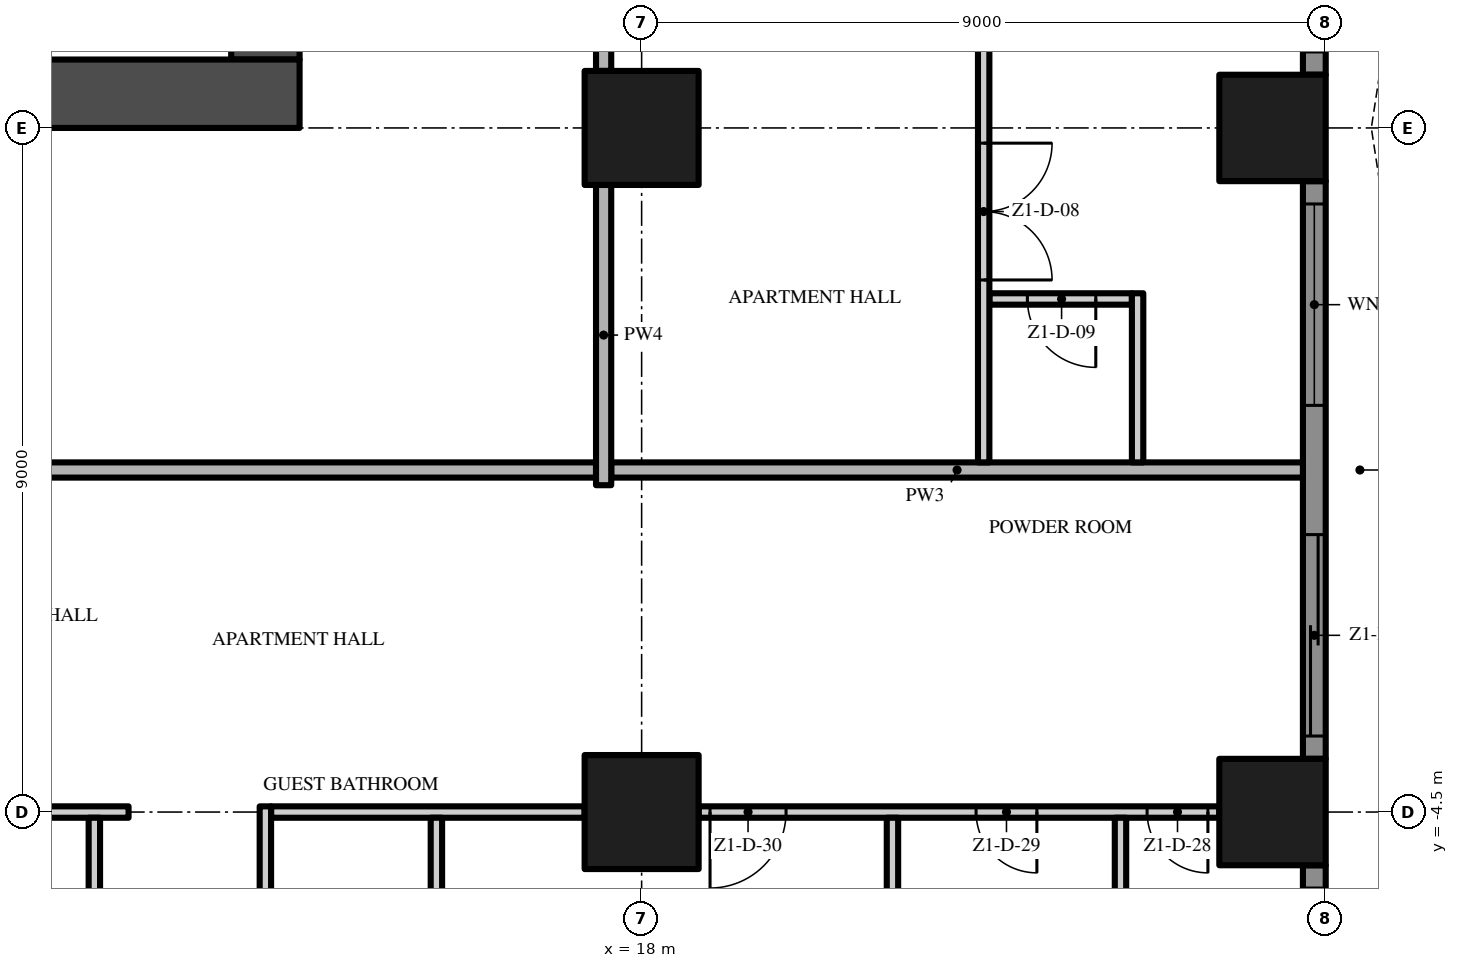
"""IFC4 building model, lengths in metres.
Left out: names, types, materials, properties, quantities, classifications, styles, units other than length and angle.
Written with IfcOpenShell. Run it as: python <this file> out.ifc"""

import sys

from ifc_helpers import new_model, si_unit, direction, frame, frame_2d, origin, origin_2d, place, context, subcontext, project, spatial, polyline, rectangle, outline, extrude, element, fill, save


model = new_model("IFC4")
c1 = context("Model", 3, precision=1e-05, world=origin(), true_north=direction((0.0, 1.0)))
c2 = subcontext(c1, "Body", "Model", "MODEL_VIEW")
j1 = project(units=[si_unit("LENGTHUNIT", "METRE"), si_unit("PLANEANGLEUNIT", "RADIAN")], contexts=[c1])
p1 = place(None, origin())
s1 = spatial("IfcSite", under=j1, at=p1, CompositionType="ELEMENT")
p2 = place(p1, origin())
s2 = spatial("IfcBuilding", under=s1, at=p2, CompositionType="ELEMENT")
p3 = place(p2, frame((0.0, 0.0, 53.0)))
s3 = spatial("IfcBuildingStorey", under=s2, at=p3, CompositionType="ELEMENT", Elevation=53.0)
p4 = place(p3, frame((-13.5, 4.95, -0.3), z_axis=(0.0, 0.0, 1.0), x_axis=(1.0, 0.0, 0.0)))
e1 = element("IfcWall", 1, at=p4, inside=s3, PredefinedType="SHEAR", context=c2, shape_type="SweptSolid", body=[
    extrude(rectangle(XDim=27.0, YDim=0.9, at=frame_2d((13.5, 0.0))), origin(), (0.0, 0.0, 1.0), 3.8),
])
p5 = place(p4, frame((12.0, 0.0, 0.3)))
e2 = element("IfcOpeningElement", 2, at=p5, cuts=e1, PredefinedType="OPENING", context=c2, shape_type="SweptSolid", body=[
    extrude(rectangle(XDim=3.0, YDim=2.4, at=frame_2d((1.5, 1.2))), frame((0.0, 0.46, 0.0), z_axis=(0.0, -1.0, 0.0), x_axis=(1.0, 0.0, 0.0)), (0.0, 0.0, 1.0), 0.92),
])
p6 = place(p4, frame((4.9, 0.0, 0.3)))
e3 = element("IfcOpeningElement", 3, at=p6, cuts=e1, PredefinedType="OPENING", context=c2, shape_type="SweptSolid", body=[
    extrude(rectangle(XDim=1.2, YDim=2.2, at=frame_2d((0.6, 1.1))), frame((0.0, 0.46, 0.0), z_axis=(0.0, -1.0, 0.0), x_axis=(1.0, 0.0, 0.0)), (0.0, 0.0, 1.0), 0.92),
])
p7 = place(p4, frame((20.75, 0.0, 0.3)))
e4 = element("IfcOpeningElement", 4, at=p7, cuts=e1, PredefinedType="OPENING", context=c2, shape_type="SweptSolid", body=[
    extrude(rectangle(XDim=1.5, YDim=2.2, at=frame_2d((0.75, 1.1))), frame((0.0, 0.46, 0.0), z_axis=(0.0, -1.0, 0.0), x_axis=(1.0, 0.0, 0.0)), (0.0, 0.0, 1.0), 0.92),
])
p8 = place(p4, frame((17.4, 0.0, 0.3)))
e5 = element("IfcOpeningElement", 5, at=p8, cuts=e1, PredefinedType="OPENING", context=c2, shape_type="SweptSolid", body=[
    extrude(rectangle(XDim=1.2, YDim=2.2, at=frame_2d((0.6, 1.1))), frame((0.0, 0.46, 0.0), z_axis=(0.0, -1.0, 0.0), x_axis=(1.0, 0.0, 0.0)), (0.0, 0.0, 1.0), 0.92),
])
p9 = place(p3, frame((13.05, 5.4, -0.3), z_axis=(0.0, 0.0, 1.0), x_axis=(0.0, 1.0, 0.0)))
e6 = element("IfcWall", 6, at=p9, inside=s3, PredefinedType="SHEAR", context=c2, shape_type="SweptSolid", body=[
    extrude(rectangle(XDim=16.2, YDim=0.9, at=frame_2d((8.1, 0.0))), origin(), (0.0, 0.0, 1.0), 3.8),
])
p10 = place(p9, frame((6.0, 0.0, 0.3)))
e7 = element("IfcOpeningElement", 7, at=p10, cuts=e6, PredefinedType="OPENING", context=c2, shape_type="SweptSolid", body=[
    extrude(rectangle(XDim=1.2, YDim=2.2, at=frame_2d((0.6, 1.1))), frame((0.0, 0.46, 0.0), z_axis=(0.0, -1.0, 0.0), x_axis=(1.0, 0.0, 0.0)), (0.0, 0.0, 1.0), 0.92),
])
for number, where, z_axis, x_axis in (
    (8, (18.0, -4.5, 0.0), (0.0, 0.0, 1.0), (1.0, 0.0, 0.0)),
    (9, (18.0, 4.5, 0.0), (0.0, 0.0, 1.0), (1.0, 0.0, 0.0)),
):
    element("IfcColumn", number, at=place(p3, frame(where, z_axis=z_axis, x_axis=x_axis)), inside=s3, PredefinedType="COLUMN", context=c2, shape_type="SweptSolid", body=[
        extrude(rectangle(XDim=1.5, YDim=1.5, at=origin_2d()), origin(), (0.0, 0.0, 1.0), 3.5),
    ])
for number, where, z_axis, x_axis in (
    (10, (26.3, -4.5, 0.0), (0.0, 0.0, 1.0), (1.0, 0.0, 0.0)),
    (11, (26.3, 4.5, 0.0), (0.0, 0.0, 1.0), (1.0, 0.0, 0.0)),
):
    element("IfcColumn", number, at=place(p3, frame(where, z_axis=z_axis, x_axis=x_axis)), inside=s3, PredefinedType="COLUMN", context=c2, shape_type="SweptSolid", body=[
        extrude(rectangle(XDim=1.4, YDim=1.4, at=origin_2d()), origin(), (0.0, 0.0, 1.0), 3.5),
    ])
p11 = place(p3, frame((26.85, -5.2, 0.0), z_axis=(0.0, 0.0, 1.0), x_axis=(0.0, -1.0, 0.0)))
e12 = element("IfcWall", 12, at=p11, inside=s3, PredefinedType="SOLIDWALL", context=c2, shape_type="SweptSolid", body=[
    extrude(rectangle(XDim=7.6, YDim=0.3, at=frame_2d((3.8, 0.0))), origin(), (0.0, 0.0, 1.0), 3.5),
])
p12 = place(p11, frame((4.65, 0.0, 0.45)))
e13 = element("IfcOpeningElement", 13, at=p12, cuts=e12, PredefinedType="OPENING", context=c2, shape_type="SweptSolid", body=[
    extrude(rectangle(XDim=2.65, YDim=2.65, at=frame_2d((1.325, 1.325))), frame((0.0, 0.16, 0.0), z_axis=(0.0, -1.0, 0.0), x_axis=(1.0, 0.0, 0.0)), (0.0, 0.0, 1.0), 0.32),
])
p13 = place(p11, frame((0.3, 0.0, 0.45)))
e14 = element("IfcOpeningElement", 14, at=p13, cuts=e12, PredefinedType="OPENING", context=c2, shape_type="SweptSolid", body=[
    extrude(rectangle(XDim=2.65, YDim=2.65, at=frame_2d((1.325, 1.325))), frame((0.0, 0.16, 0.0), z_axis=(0.0, -1.0, 0.0), x_axis=(1.0, 0.0, 0.0)), (0.0, 0.0, 1.0), 0.32),
])
p14 = place(p3, frame((26.85, 3.8, 0.0), z_axis=(0.0, 0.0, 1.0), x_axis=(0.0, -1.0, 0.0)))
e15 = element("IfcWall", 15, at=p14, inside=s3, PredefinedType="SOLIDWALL", context=c2, shape_type="SweptSolid", body=[
    extrude(rectangle(XDim=7.6, YDim=0.3, at=frame_2d((3.8, 0.0))), origin(), (0.0, 0.0, 1.0), 3.5),
])
p15 = place(p14, frame((4.65, 0.0, 0.0)))
e16 = element("IfcOpeningElement", 16, at=p15, cuts=e15, PredefinedType="OPENING", context=c2, shape_type="SweptSolid", body=[
    extrude(rectangle(XDim=2.65, YDim=2.4, at=frame_2d((1.325, 1.2))), frame((0.0, 0.16, 0.0), z_axis=(0.0, -1.0, 0.0), x_axis=(1.0, 0.0, 0.0)), (0.0, 0.0, 1.0), 0.32),
])
p16 = place(p14, frame((0.3, 0.0, 0.45)))
e17 = element("IfcOpeningElement", 17, at=p16, cuts=e15, PredefinedType="OPENING", context=c2, shape_type="SweptSolid", body=[
    extrude(rectangle(XDim=2.65, YDim=2.65, at=frame_2d((1.325, 1.325))), frame((0.0, 0.16, 0.0), z_axis=(0.0, -1.0, 0.0), x_axis=(1.0, 0.0, 0.0)), (0.0, 0.0, 1.0), 0.32),
])
p17 = place(p3, frame((26.85, 12.8, 0.0), z_axis=(0.0, 0.0, 1.0), x_axis=(0.0, -1.0, 0.0)))
e18 = element("IfcWall", 18, at=p17, inside=s3, PredefinedType="SOLIDWALL", context=c2, shape_type="SweptSolid", body=[
    extrude(rectangle(XDim=7.6, YDim=0.3, at=frame_2d((3.8, 0.0))), origin(), (0.0, 0.0, 1.0), 3.5),
])
p18 = place(p17, frame((4.65, 0.0, 0.45)))
e19 = element("IfcOpeningElement", 19, at=p18, cuts=e18, PredefinedType="OPENING", context=c2, shape_type="SweptSolid", body=[
    extrude(rectangle(XDim=2.65, YDim=2.65, at=frame_2d((1.325, 1.325))), frame((0.0, 0.16, 0.0), z_axis=(0.0, -1.0, 0.0), x_axis=(1.0, 0.0, 0.0)), (0.0, 0.0, 1.0), 0.32),
])
p19 = place(p17, frame((0.3, 0.0, 0.0)))
e20 = element("IfcOpeningElement", 20, at=p19, cuts=e18, PredefinedType="OPENING", context=c2, shape_type="SweptSolid", body=[
    extrude(rectangle(XDim=2.65, YDim=2.4, at=frame_2d((1.325, 1.2))), frame((0.0, 0.16, 0.0), z_axis=(0.0, -1.0, 0.0), x_axis=(1.0, 0.0, 0.0)), (0.0, 0.0, 1.0), 0.32),
])
p20 = place(p3, origin())
e21 = element("IfcWall", 21, at=p20, inside=s3, PredefinedType="USERDEFINED", context=c2, shape_type="SweptSolid", body=[
    extrude(outline(polyline([(30.0, -18.0), (29.771, -16.5), (29.171, -15.0), (28.429, -13.5), (27.829, -12.0), (27.6, -10.5), (27.829, -9.0), (28.429, -7.5), (29.171, -6.0), (29.771, -4.5), (30.0, -3.0), (29.771, -1.5), (29.171, 0.0), (28.429, 1.5), (27.829, 3.0), (27.6, 4.5), (27.829, 6.0), (28.429, 7.5), (29.171, 9.0), (29.771, 10.5), (30.0, 12.0), (29.771, 13.5), (29.171, 15.0), (28.429, 16.5), (27.829, 18.0), (27.597, 17.907), (28.201, 16.398), (28.942, 14.898), (29.528, 13.434), (29.747, 12.0), (29.528, 10.566), (28.942, 9.102), (28.201, 7.602), (27.586, 6.066), (27.347, 4.5), (27.586, 2.934), (28.201, 1.398), (28.942, -0.102), (29.528, -1.566), (29.747, -3.0), (29.528, -4.434), (28.942, -5.898), (28.201, -7.398), (27.586, -8.934), (27.347, -10.5), (27.586, -12.066), (28.201, -13.602), (28.942, -15.102), (29.528, -16.566), (29.753, -18.038), (30.0, -18.0)])), origin(), (0.0, 0.0, 1.0), 0.9),
])
p21 = place(p3, frame((9.75, -4.5, 0.0), z_axis=(0.0, 0.0, 1.0), x_axis=(1.0, 0.0, 0.0)))
e22 = element("IfcWall", 22, at=p21, inside=s3, PredefinedType="PARTITIONING", context=c2, shape_type="SweptSolid", body=[
    extrude(rectangle(XDim=1.5, YDim=0.15, at=frame_2d((0.75, 0.0))), origin(), (0.0, 0.0, 1.0), 3.5),
])
p22 = place(p3, frame((13.125, -4.5, 0.0), z_axis=(0.0, 0.0, 1.0), x_axis=(1.0, 0.0, 0.0)))
e23 = element("IfcWall", 23, at=p22, inside=s3, PredefinedType="PARTITIONING", context=c2, shape_type="SweptSolid", body=[
    extrude(rectangle(XDim=4.125, YDim=0.15, at=frame_2d((2.062, 0.0))), origin(), (0.0, 0.0, 1.0), 3.5),
])
p23 = place(p3, frame((25.6, -4.5, 0.0), z_axis=(0.0, 0.0, 1.0), x_axis=(-1.0, 0.0, 0.0)))
e24 = element("IfcWall", 24, at=p23, inside=s3, PredefinedType="PARTITIONING", context=c2, shape_type="SweptSolid", body=[
    extrude(rectangle(XDim=6.85, YDim=0.15, at=frame_2d((3.425, 0.0))), origin(), (0.0, 0.0, 1.0), 3.5),
])
p24 = place(p23, frame((0.15, 0.0, 0.0)))
e25 = element("IfcOpeningElement", 25, at=p24, cuts=e24, PredefinedType="OPENING", context=c2, shape_type="SweptSolid", body=[
    extrude(rectangle(XDim=0.8, YDim=2.0, at=frame_2d((0.4, 1.0))), frame((0.0, 0.085, 0.0), z_axis=(0.0, -1.0, 0.0), x_axis=(1.0, 0.0, 0.0)), (0.0, 0.0, 1.0), 0.17),
])
p25 = place(p23, frame((2.4, 0.0, 0.0)))
e26 = element("IfcOpeningElement", 26, at=p25, cuts=e24, PredefinedType="OPENING", context=c2, shape_type="SweptSolid", body=[
    extrude(rectangle(XDim=0.8, YDim=2.0, at=frame_2d((0.4, 1.0))), frame((0.0, 0.085, 0.0), z_axis=(0.0, -1.0, 0.0), x_axis=(1.0, 0.0, 0.0)), (0.0, 0.0, 1.0), 0.17),
])
p26 = place(p23, frame((5.7, 0.0, 0.0)))
e27 = element("IfcOpeningElement", 27, at=p26, cuts=e24, PredefinedType="OPENING", context=c2, shape_type="SweptSolid", body=[
    extrude(rectangle(XDim=1.0, YDim=2.4, at=frame_2d((0.5, 1.2))), frame((0.0, 0.085, 0.0), z_axis=(0.0, -1.0, 0.0), x_axis=(1.0, 0.0, 0.0)), (0.0, 0.0, 1.0), 0.17),
])
p27 = place(p3, frame((17.4, 0.0, 0.0), z_axis=(0.0, 0.0, 1.0), x_axis=(-1.0, 0.0, 0.0)))
e28 = element("IfcWall", 28, at=p27, inside=s3, PredefinedType="PARTITIONING", context=c2, shape_type="SweptSolid", body=[
    extrude(rectangle(XDim=17.3, YDim=0.2, at=frame_2d((8.65, 0.0))), origin(), (0.0, 0.0, 1.0), 3.5),
])
p28 = place(p27, frame((7.65, 0.0, 0.0)))
e29 = element("IfcOpeningElement", 29, at=p28, cuts=e28, PredefinedType="OPENING", context=c2, shape_type="SweptSolid", body=[
    extrude(rectangle(XDim=1.5, YDim=2.4, at=frame_2d((0.75, 1.2))), frame((0.0, 0.11, 0.0), z_axis=(0.0, -1.0, 0.0), x_axis=(1.0, 0.0, 0.0)), (0.0, 0.0, 1.0), 0.22),
])
p29 = place(p3, frame((17.6, 0.0, 0.0), z_axis=(0.0, 0.0, 1.0), x_axis=(1.0, 0.0, 0.0)))
e30 = element("IfcWall", 30, at=p29, inside=s3, PredefinedType="PARTITIONING", context=c2, shape_type="SweptSolid", body=[
    extrude(rectangle(XDim=9.1, YDim=0.2, at=frame_2d((4.55, 0.0))), origin(), (0.0, 0.0, 1.0), 3.5),
])
p30 = place(p3, frame((24.45, 2.25, 0.0), z_axis=(0.0, 0.0, 1.0), x_axis=(-1.0, 0.0, 0.0)))
e31 = element("IfcWall", 31, at=p30, inside=s3, PredefinedType="PARTITIONING", context=c2, shape_type="SweptSolid", body=[
    extrude(rectangle(XDim=1.875, YDim=0.15, at=frame_2d((0.938, 0.0))), origin(), (0.0, 0.0, 1.0), 3.5),
])
p31 = place(p30, frame((0.475, 0.0, 0.0)))
e32 = element("IfcOpeningElement", 32, at=p31, cuts=e31, PredefinedType="OPENING", context=c2, shape_type="SweptSolid", body=[
    extrude(rectangle(XDim=0.9, YDim=2.1, at=frame_2d((0.45, 1.05))), frame((0.0, 0.085, 0.0), z_axis=(0.0, -1.0, 0.0), x_axis=(1.0, 0.0, 0.0)), (0.0, 0.0, 1.0), 0.17),
])
p32 = place(p3, frame((10.8, -9.075, 0.0), z_axis=(0.0, 0.0, 1.0), x_axis=(0.0, 1.0, 0.0)))
e33 = element("IfcWall", 33, at=p32, inside=s3, PredefinedType="PARTITIONING", context=c2, shape_type="SweptSolid", body=[
    extrude(rectangle(XDim=4.5, YDim=0.15, at=frame_2d((2.25, 0.0))), origin(), (0.0, 0.0, 1.0), 3.5),
])
p33 = place(p3, frame((13.05, -4.425, 0.0), z_axis=(0.0, 0.0, 1.0), x_axis=(0.0, -1.0, 0.0)))
e34 = element("IfcWall", 34, at=p33, inside=s3, PredefinedType="PARTITIONING", context=c2, shape_type="SweptSolid", body=[
    extrude(rectangle(XDim=4.65, YDim=0.15, at=frame_2d((2.325, 0.0))), origin(), (0.0, 0.0, 1.0), 3.5),
])
p34 = place(p33, frame((1.875, 0.0, 0.0)))
e35 = element("IfcOpeningElement", 35, at=p34, cuts=e34, PredefinedType="OPENING", context=c2, shape_type="SweptSolid", body=[
    extrude(rectangle(XDim=0.9, YDim=2.1, at=frame_2d((0.45, 1.05))), frame((0.0, 0.085, 0.0), z_axis=(0.0, -1.0, 0.0), x_axis=(1.0, 0.0, 0.0)), (0.0, 0.0, 1.0), 0.17),
])
p35 = place(p3, frame((15.3, -8.925, 0.0), z_axis=(0.0, 0.0, 1.0), x_axis=(0.0, 1.0, 0.0)))
e36 = element("IfcWall", 36, at=p35, inside=s3, PredefinedType="PARTITIONING", context=c2, shape_type="SweptSolid", body=[
    extrude(rectangle(XDim=4.35, YDim=0.15, at=frame_2d((2.175, 0.0))), origin(), (0.0, 0.0, 1.0), 3.5),
])
p36 = place(p3, frame((17.5, -0.2, 0.0), z_axis=(0.0, 0.0, 1.0), x_axis=(0.0, 1.0, 0.0)))
e37 = element("IfcWall", 37, at=p36, inside=s3, PredefinedType="PARTITIONING", context=c2, shape_type="SweptSolid", body=[
    extrude(rectangle(XDim=3.95, YDim=0.2, at=frame_2d((1.975, 0.0))), origin(), (0.0, 0.0, 1.0), 3.5),
])
p37 = place(p3, frame((17.5, 12.75, 0.0), z_axis=(0.0, 0.0, 1.0), x_axis=(0.0, -1.0, 0.0)))
e38 = element("IfcWall", 38, at=p37, inside=s3, PredefinedType="PARTITIONING", context=c2, shape_type="SweptSolid", body=[
    extrude(rectangle(XDim=7.5, YDim=0.2, at=frame_2d((3.75, 0.0))), origin(), (0.0, 0.0, 1.0), 3.5),
])
p38 = place(p37, frame((5.4, 0.0, 0.0)))
e39 = element("IfcOpeningElement", 39, at=p38, cuts=e38, PredefinedType="OPENING", context=c2, shape_type="SweptSolid", body=[
    extrude(rectangle(XDim=1.2, YDim=2.4, at=frame_2d((0.6, 1.2))), frame((0.0, 0.11, 0.0), z_axis=(0.0, -1.0, 0.0), x_axis=(1.0, 0.0, 0.0)), (0.0, 0.0, 1.0), 0.22),
])
p39 = place(p3, frame((21.3, -8.925, 0.0), z_axis=(0.0, 0.0, 1.0), x_axis=(0.0, 1.0, 0.0)))
e40 = element("IfcWall", 40, at=p39, inside=s3, PredefinedType="PARTITIONING", context=c2, shape_type="SweptSolid", body=[
    extrude(rectangle(XDim=4.35, YDim=0.15, at=frame_2d((2.175, 0.0))), origin(), (0.0, 0.0, 1.0), 3.5),
])
p40 = place(p3, frame((22.5, 17.3, 0.0), z_axis=(0.0, 0.0, 1.0), x_axis=(0.0, -1.0, 0.0)))
e41 = element("IfcWall", 41, at=p40, inside=s3, PredefinedType="PARTITIONING", context=c2, shape_type="SweptSolid", body=[
    extrude(rectangle(XDim=17.2, YDim=0.15, at=frame_2d((8.6, 0.0))), origin(), (0.0, 0.0, 1.0), 3.5),
])
p41 = place(p40, frame((13.0, 0.0, 0.0)))
e42 = element("IfcOpeningElement", 42, at=p41, cuts=e41, PredefinedType="OPENING", context=c2, shape_type="SweptSolid", body=[
    extrude(rectangle(XDim=1.8, YDim=2.4, at=frame_2d((0.9, 1.2))), frame((0.0, 0.085, 0.0), z_axis=(0.0, -1.0, 0.0), x_axis=(1.0, 0.0, 0.0)), (0.0, 0.0, 1.0), 0.17),
])
p42 = place(p40, frame((5.55, 0.0, 0.0)))
e43 = element("IfcOpeningElement", 43, at=p42, cuts=e41, PredefinedType="OPENING", context=c2, shape_type="SweptSolid", body=[
    extrude(rectangle(XDim=1.0, YDim=2.4, at=frame_2d((0.5, 1.2))), frame((0.0, 0.085, 0.0), z_axis=(0.0, -1.0, 0.0), x_axis=(1.0, 0.0, 0.0)), (0.0, 0.0, 1.0), 0.17),
])
p43 = place(p40, frame((0.15, 0.0, 0.0)))
e44 = element("IfcOpeningElement", 44, at=p43, cuts=e41, PredefinedType="OPENING", context=c2, shape_type="SweptSolid", body=[
    extrude(rectangle(XDim=1.0, YDim=2.4, at=frame_2d((0.5, 1.2))), frame((0.0, 0.085, 0.0), z_axis=(0.0, -1.0, 0.0), x_axis=(1.0, 0.0, 0.0)), (0.0, 0.0, 1.0), 0.17),
])
p44 = place(p3, frame((24.3, -8.925, 0.0), z_axis=(0.0, 0.0, 1.0), x_axis=(0.0, 1.0, 0.0)))
e45 = element("IfcWall", 45, at=p44, inside=s3, PredefinedType="PARTITIONING", context=c2, shape_type="SweptSolid", body=[
    extrude(rectangle(XDim=4.35, YDim=0.15, at=frame_2d((2.175, 0.0))), origin(), (0.0, 0.0, 1.0), 3.5),
])
p45 = place(p3, frame((24.525, 0.1, 0.0), z_axis=(0.0, 0.0, 1.0), x_axis=(0.0, 1.0, 0.0)))
e46 = element("IfcWall", 46, at=p45, inside=s3, PredefinedType="PARTITIONING", context=c2, shape_type="SweptSolid", body=[
    extrude(rectangle(XDim=2.225, YDim=0.15, at=frame_2d((1.113, 0.0))), origin(), (0.0, 0.0, 1.0), 3.5),
])
p46 = place(p15, origin())
e47 = element("IfcDoor", 47, at=p46, inside=s3, OperationType="SINGLE_SWING_LEFT", PredefinedType="DOOR", context=c2, shape_type="SweptSolid", body=[
    extrude(rectangle(XDim=2.65, YDim=2.4, at=frame_2d((1.325, 1.2))), frame((0.0, 0.025, 0.0), z_axis=(0.0, -1.0, 0.0), x_axis=(1.0, 0.0, 0.0)), (0.0, 0.0, 1.0), 0.05),
])
fill(e16, e47)
p47 = place(p16, origin())
e48 = element("IfcWindow", 48, at=p47, inside=s3, PartitioningType="SINGLE_PANEL", PredefinedType="WINDOW", context=c2, shape_type="SweptSolid", body=[
    extrude(rectangle(XDim=2.65, YDim=2.65, at=frame_2d((1.325, 1.325))), frame((0.0, 0.03, 0.0), z_axis=(0.0, -1.0, 0.0), x_axis=(1.0, 0.0, 0.0)), (0.0, 0.0, 1.0), 0.06),
])
fill(e17, e48)
p48 = place(p41, origin())
e49 = element("IfcDoor", 49, at=p48, inside=s3, OperationType="DOUBLE_DOOR_SINGLE_SWING", PredefinedType="DOOR", context=c2, shape_type="SweptSolid", body=[
    extrude(rectangle(XDim=1.8, YDim=2.4, at=frame_2d((0.9, 1.2))), frame((0.0, 0.025, 0.0), z_axis=(0.0, -1.0, 0.0), x_axis=(1.0, 0.0, 0.0)), (0.0, 0.0, 1.0), 0.05),
])
fill(e42, e49)
p49 = place(p31, origin())
e50 = element("IfcDoor", 50, at=p49, inside=s3, OperationType="SINGLE_SWING_LEFT", PredefinedType="DOOR", context=c2, shape_type="SweptSolid", body=[
    extrude(rectangle(XDim=0.9, YDim=2.1, at=frame_2d((0.45, 1.05))), frame((0.0, 0.025, 0.0), z_axis=(0.0, -1.0, 0.0), x_axis=(1.0, 0.0, 0.0)), (0.0, 0.0, 1.0), 0.05),
])
fill(e32, e50)
p50 = place(p24, origin())
e51 = element("IfcDoor", 51, at=p50, inside=s3, OperationType="SINGLE_SWING_LEFT", PredefinedType="DOOR", context=c2, shape_type="SweptSolid", body=[
    extrude(rectangle(XDim=0.8, YDim=2.0, at=frame_2d((0.4, 1.0))), frame((0.0, 0.025, 0.0), z_axis=(0.0, -1.0, 0.0), x_axis=(1.0, 0.0, 0.0)), (0.0, 0.0, 1.0), 0.05),
])
fill(e25, e51)
p51 = place(p25, origin())
e52 = element("IfcDoor", 52, at=p51, inside=s3, OperationType="SINGLE_SWING_LEFT", PredefinedType="DOOR", context=c2, shape_type="SweptSolid", body=[
    extrude(rectangle(XDim=0.8, YDim=2.0, at=frame_2d((0.4, 1.0))), frame((0.0, 0.025, 0.0), z_axis=(0.0, -1.0, 0.0), x_axis=(1.0, 0.0, 0.0)), (0.0, 0.0, 1.0), 0.05),
])
fill(e26, e52)
p52 = place(p26, origin())
e53 = element("IfcDoor", 53, at=p52, inside=s3, OperationType="SINGLE_SWING_RIGHT", PredefinedType="DOOR", context=c2, shape_type="SweptSolid", body=[
    extrude(rectangle(XDim=1.0, YDim=2.4, at=frame_2d((0.5, 1.2))), frame((0.0, 0.025, 0.0), z_axis=(0.0, -1.0, 0.0), x_axis=(1.0, 0.0, 0.0)), (0.0, 0.0, 1.0), 0.05),
])
fill(e27, e53)
save(model, sys.argv[1])
